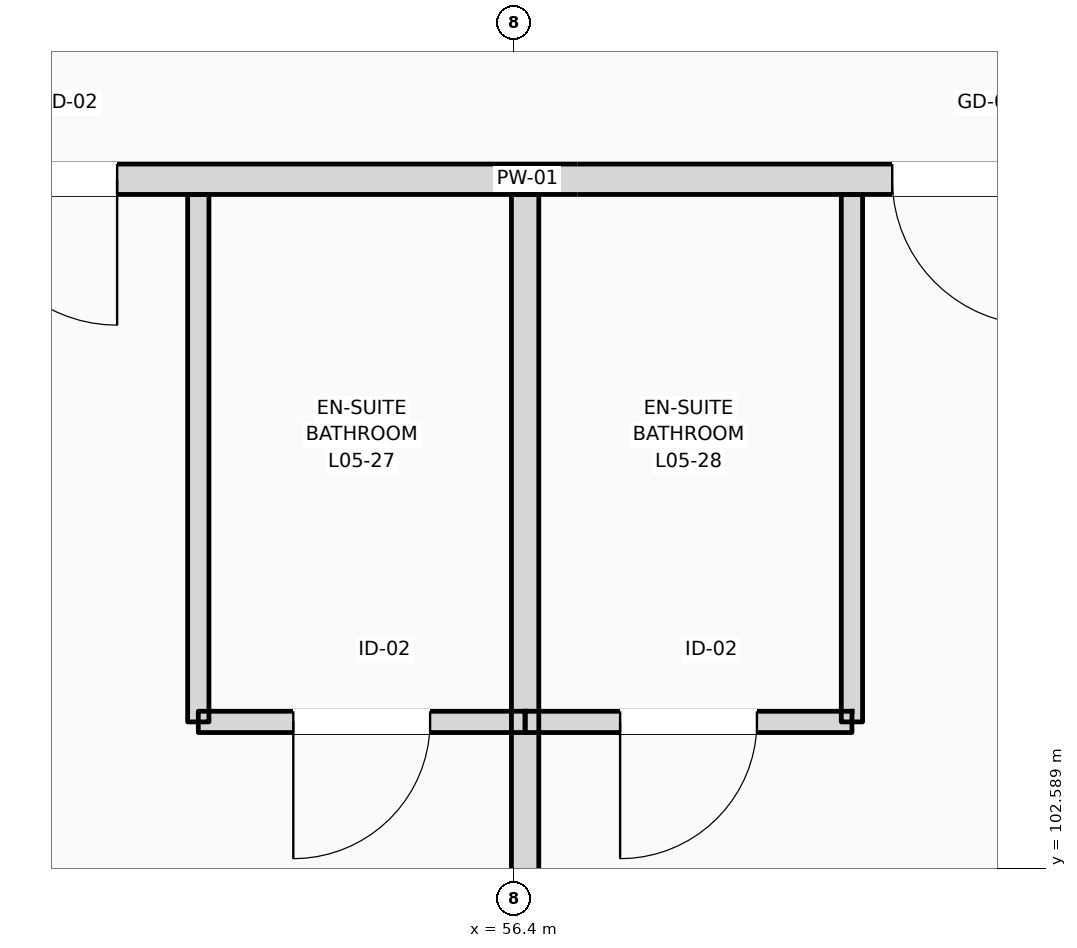
"""IFC4 building model, lengths in metres.
Left out: names, types, materials, properties, quantities, classifications, styles, units other than length and angle.
Written with IfcOpenShell. Run it as: python <this file> out.ifc"""

import sys

from ifc_helpers import new_model, si_unit, direction, frame, frame_2d, origin, place, context, subcontext, project, spatial, rectangle, extrude, element, fill, save


model = new_model("IFC4")
c1 = context("Model", 3, precision=1e-05, world=origin(), true_north=direction((0.0, 1.0)))
c2 = subcontext(c1, "Body", "Model", "MODEL_VIEW")
j1 = project(units=[si_unit("LENGTHUNIT", "METRE"), si_unit("PLANEANGLEUNIT", "RADIAN")], contexts=[c1])
p1 = place(None, origin())
s1 = spatial("IfcSite", under=j1, at=p1, CompositionType="ELEMENT")
p2 = place(p1, origin())
s2 = spatial("IfcBuilding", under=s1, at=p2, CompositionType="ELEMENT")
p3 = place(p2, frame((0.0, 0.0, 24.6)))
s3 = spatial("IfcBuildingStorey", under=s2, at=p3, CompositionType="ELEMENT", Elevation=24.6)
p4 = place(p3, frame((40.76, 107.12, 0.0), z_axis=(0.0, 0.0, 1.0), x_axis=(1.0, 0.0, 0.0)))
e1 = element("IfcWall", 1, at=p4, inside=s3, PredefinedType="PARTITIONING", context=c2, shape_type="SweptSolid", body=[
    extrude(rectangle(XDim=23.44, YDim=0.2, at=frame_2d((11.72, 0.0))), origin(), (0.0, 0.0, 1.0), 3.34),
])
p5 = place(p4, frame((2.449, 0.0, 0.0)))
e2 = element("IfcOpeningElement", 2, at=p5, cuts=e1, PredefinedType="OPENING", context=c2, shape_type="SweptSolid", body=[
    extrude(rectangle(XDim=0.96, YDim=2.2, at=frame_2d((0.48, 1.1))), frame((0.0, 0.11, 0.0), z_axis=(0.0, -1.0, 0.0), x_axis=(1.0, 0.0, 0.0)), (0.0, 0.0, 1.0), 0.22),
])
p6 = place(p4, frame((4.253, 0.0, 0.0)))
e3 = element("IfcOpeningElement", 3, at=p6, cuts=e1, PredefinedType="OPENING", context=c2, shape_type="SweptSolid", body=[
    extrude(rectangle(XDim=0.96, YDim=2.2, at=frame_2d((0.48, 1.1))), frame((0.0, 0.11, 0.0), z_axis=(0.0, -1.0, 0.0), x_axis=(1.0, 0.0, 0.0)), (0.0, 0.0, 1.0), 0.22),
])
p7 = place(p4, frame((10.311, 0.0, 0.0)))
e4 = element("IfcOpeningElement", 4, at=p7, cuts=e1, PredefinedType="OPENING", context=c2, shape_type="SweptSolid", body=[
    extrude(rectangle(XDim=0.96, YDim=2.2, at=frame_2d((0.48, 1.1))), frame((0.0, 0.11, 0.0), z_axis=(0.0, -1.0, 0.0), x_axis=(1.0, 0.0, 0.0)), (0.0, 0.0, 1.0), 0.22),
])
p8 = place(p4, frame((12.069, 0.0, 0.0)))
e5 = element("IfcOpeningElement", 5, at=p8, cuts=e1, PredefinedType="OPENING", context=c2, shape_type="SweptSolid", body=[
    extrude(rectangle(XDim=0.96, YDim=2.2, at=frame_2d((0.48, 1.1))), frame((0.0, 0.11, 0.0), z_axis=(0.0, -1.0, 0.0), x_axis=(1.0, 0.0, 0.0)), (0.0, 0.0, 1.0), 0.22),
])
p9 = place(p4, frame((18.128, 0.0, 0.0)))
e6 = element("IfcOpeningElement", 6, at=p9, cuts=e1, PredefinedType="OPENING", context=c2, shape_type="SweptSolid", body=[
    extrude(rectangle(XDim=0.96, YDim=2.2, at=frame_2d((0.48, 1.1))), frame((0.0, 0.11, 0.0), z_axis=(0.0, -1.0, 0.0), x_axis=(1.0, 0.0, 0.0)), (0.0, 0.0, 1.0), 0.22),
])
p10 = place(p4, frame((19.841, 0.0, 0.0)))
e7 = element("IfcOpeningElement", 7, at=p10, cuts=e1, PredefinedType="OPENING", context=c2, shape_type="SweptSolid", body=[
    extrude(rectangle(XDim=0.96, YDim=2.2, at=frame_2d((0.48, 1.1))), frame((0.0, 0.11, 0.0), z_axis=(0.0, -1.0, 0.0), x_axis=(1.0, 0.0, 0.0)), (0.0, 0.0, 1.0), 0.22),
])
p11 = place(p3, frame((56.473, 96.14, 0.0), z_axis=(0.0, 0.0, 1.0), x_axis=(0.0, 1.0, 0.0)))
e8 = element("IfcWall", 8, at=p11, inside=s3, PredefinedType="PARTITIONING", context=c2, shape_type="SweptSolid", body=[
    extrude(rectangle(XDim=10.88, YDim=0.18, at=frame_2d((5.44, 0.0))), origin(), (0.0, 0.0, 1.0), 2.93),
])
p12 = place(p3, frame((54.323, 103.55, 0.0), z_axis=(0.0, 0.0, 1.0), x_axis=(0.0, 1.0, 0.0)))
e9 = element("IfcWall", 9, at=p12, inside=s3, PredefinedType="PARTITIONING", context=c2, shape_type="SweptSolid", body=[
    extrude(rectangle(XDim=3.47, YDim=0.14, at=frame_2d((1.735, 0.0))), origin(), (0.0, 0.0, 1.0), 3.34),
])
p13 = place(p3, frame((54.323, 103.55, 0.0), z_axis=(0.0, 0.0, 1.0), x_axis=(1.0, 0.0, 0.0)))
e10 = element("IfcWall", 10, at=p13, inside=s3, PredefinedType="PARTITIONING", context=c2, shape_type="SweptSolid", body=[
    extrude(rectangle(XDim=2.15, YDim=0.14, at=frame_2d((1.075, 0.0))), origin(), (0.0, 0.0, 1.0), 3.34),
])
p14 = place(p13, frame((0.625, 0.0, 0.0)))
e11 = element("IfcOpeningElement", 11, at=p14, cuts=e10, PredefinedType="OPENING", context=c2, shape_type="SweptSolid", body=[
    extrude(rectangle(XDim=0.9, YDim=2.1, at=frame_2d((0.45, 1.05))), frame((0.0, 0.08, 0.0), z_axis=(0.0, -1.0, 0.0), x_axis=(1.0, 0.0, 0.0)), (0.0, 0.0, 1.0), 0.16),
])
p15 = place(p3, frame((58.623, 103.55, 0.0), z_axis=(0.0, 0.0, 1.0), x_axis=(0.0, 1.0, 0.0)))
e12 = element("IfcWall", 12, at=p15, inside=s3, PredefinedType="PARTITIONING", context=c2, shape_type="SweptSolid", body=[
    extrude(rectangle(XDim=3.47, YDim=0.14, at=frame_2d((1.735, 0.0))), origin(), (0.0, 0.0, 1.0), 3.34),
])
p16 = place(p3, frame((56.473, 103.55, 0.0), z_axis=(0.0, 0.0, 1.0), x_axis=(1.0, 0.0, 0.0)))
e13 = element("IfcWall", 13, at=p16, inside=s3, PredefinedType="PARTITIONING", context=c2, shape_type="SweptSolid", body=[
    extrude(rectangle(XDim=2.15, YDim=0.14, at=frame_2d((1.075, 0.0))), origin(), (0.0, 0.0, 1.0), 3.34),
])
p17 = place(p16, frame((0.625, 0.0, 0.0)))
e14 = element("IfcOpeningElement", 14, at=p17, cuts=e13, PredefinedType="OPENING", context=c2, shape_type="SweptSolid", body=[
    extrude(rectangle(XDim=0.9, YDim=2.1, at=frame_2d((0.45, 1.05))), frame((0.0, 0.08, 0.0), z_axis=(0.0, -1.0, 0.0), x_axis=(1.0, 0.0, 0.0)), (0.0, 0.0, 1.0), 0.16),
])
p18 = place(p8, frame((0.96, 0.0, 0.0), z_axis=(0.0, 0.0, 1.0), x_axis=(-1.0, 0.0, 0.0)))
e15 = element("IfcDoor", 15, at=p18, inside=s3, OperationType="SINGLE_SWING_RIGHT", PredefinedType="DOOR", context=c2, shape_type="SweptSolid", body=[
    extrude(rectangle(XDim=0.96, YDim=2.2, at=frame_2d((0.48, 1.1))), frame((0.0, 0.025, 0.0), z_axis=(0.0, -1.0, 0.0), x_axis=(1.0, 0.0, 0.0)), (0.0, 0.0, 1.0), 0.05),
])
fill(e5, e15)
p19 = place(p14, frame((0.9, 0.0, 0.0), z_axis=(0.0, 0.0, 1.0), x_axis=(-1.0, 0.0, 0.0)))
e16 = element("IfcDoor", 16, at=p19, inside=s3, OperationType="SINGLE_SWING_LEFT", PredefinedType="DOOR", context=c2, shape_type="SweptSolid", body=[
    extrude(rectangle(XDim=0.9, YDim=2.1, at=frame_2d((0.45, 1.05))), frame((0.0, 0.025, 0.0), z_axis=(0.0, -1.0, 0.0), x_axis=(1.0, 0.0, 0.0)), (0.0, 0.0, 1.0), 0.05),
])
fill(e11, e16)
p20 = place(p9, frame((0.96, 0.0, 0.0), z_axis=(0.0, 0.0, 1.0), x_axis=(-1.0, 0.0, 0.0)))
e17 = element("IfcDoor", 17, at=p20, inside=s3, OperationType="SINGLE_SWING_RIGHT", PredefinedType="DOOR", context=c2, shape_type="SweptSolid", body=[
    extrude(rectangle(XDim=0.96, YDim=2.2, at=frame_2d((0.48, 1.1))), frame((0.0, 0.025, 0.0), z_axis=(0.0, -1.0, 0.0), x_axis=(1.0, 0.0, 0.0)), (0.0, 0.0, 1.0), 0.05),
])
fill(e6, e17)
p21 = place(p17, frame((0.9, 0.0, 0.0), z_axis=(0.0, 0.0, 1.0), x_axis=(-1.0, 0.0, 0.0)))
e18 = element("IfcDoor", 18, at=p21, inside=s3, OperationType="SINGLE_SWING_LEFT", PredefinedType="DOOR", context=c2, shape_type="SweptSolid", body=[
    extrude(rectangle(XDim=0.9, YDim=2.1, at=frame_2d((0.45, 1.05))), frame((0.0, 0.025, 0.0), z_axis=(0.0, -1.0, 0.0), x_axis=(1.0, 0.0, 0.0)), (0.0, 0.0, 1.0), 0.05),
])
fill(e14, e18)
save(model, sys.argv[1])
